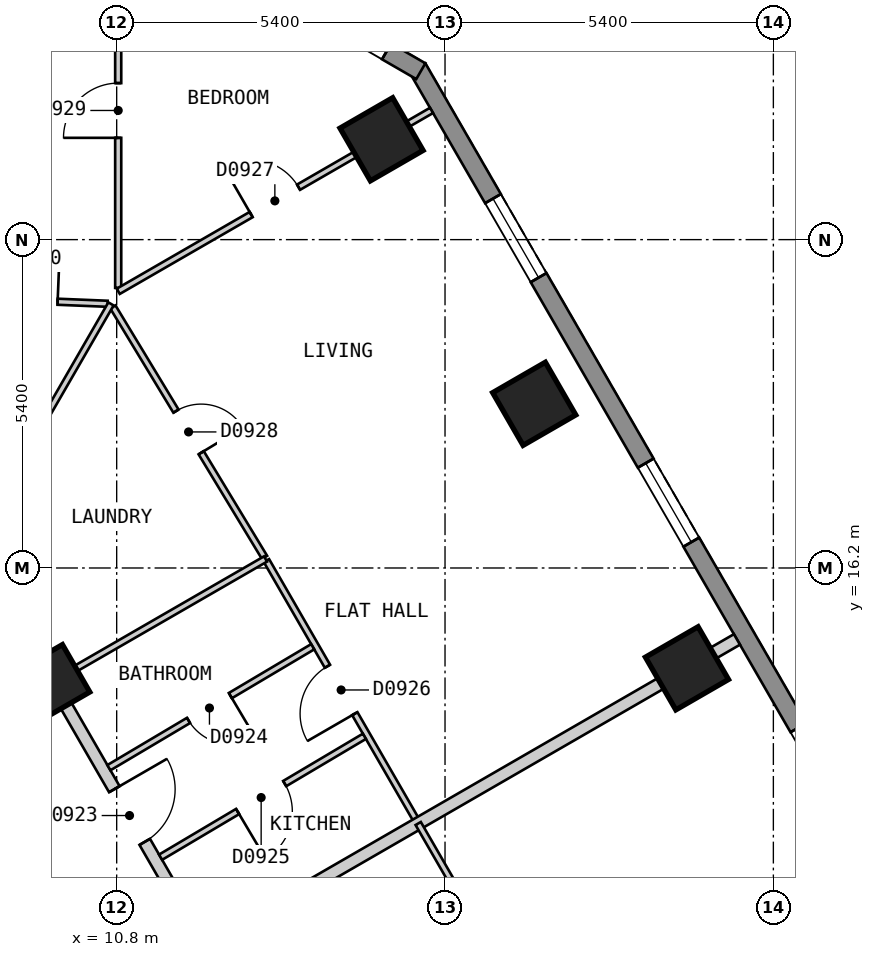
"""IFC4 building model, lengths in metres.
Left out: names, types, materials, properties, quantities, classifications, styles, units other than length and angle.
Written with IfcOpenShell. Run it as: python <this file> out.ifc"""

import sys

from ifc_helpers import new_model, si_unit, direction, frame, frame_2d, origin, origin_2d, place, context, subcontext, project, spatial, polyline, rectangle, outline, extrude, element, fill, save


model = new_model("IFC4")
c1 = context("Model", 3, precision=1e-05, world=origin(), true_north=direction((0.0, 1.0)))
c2 = subcontext(c1, "Body", "Model", "MODEL_VIEW")
j1 = project(units=[si_unit("LENGTHUNIT", "METRE"), si_unit("PLANEANGLEUNIT", "RADIAN")], contexts=[c1])
p1 = place(None, origin())
s1 = spatial("IfcSite", under=j1, at=p1, CompositionType="ELEMENT")
p2 = place(p1, origin())
s2 = spatial("IfcBuilding", under=s1, at=p2, CompositionType="ELEMENT")
p3 = place(p2, frame((0.0, 0.0, 102.0)))
s3 = spatial("IfcBuildingStorey", under=s2, at=p3, CompositionType="ELEMENT", Elevation=102.0)
for number, where, z_axis, x_axis in (
    (1, (20.179, 14.55, 0.0), (0.0, 0.0, 1.0), (-0.5, 0.866, 0.0)),
    (2, (17.667, 18.9, 0.0), (0.0, 0.0, 1.0), (-0.5, 0.866, 0.0)),
    (3, (15.156, 23.25, 0.0), (0.0, 0.0, 1.0), (-0.5, 0.866, 0.0)),
):
    element("IfcColumn", number, at=place(p3, frame(where, z_axis=z_axis, x_axis=x_axis)), inside=s3, PredefinedType="COLUMN", context=c2, shape_type="SweptSolid", body=[
        extrude(rectangle(XDim=1.0, YDim=1.0, at=origin_2d()), origin(), (0.0, 0.0, 1.0), 3.0),
    ])
p4 = place(p3, frame((9.743, 14.325, 0.0), z_axis=(0.0, 0.0, 1.0), x_axis=(-0.5, 0.866025403784, 0.0)))
e4 = element("IfcColumn", 4, at=p4, inside=s3, PredefinedType="COLUMN", context=c2, shape_type="SweptSolid", body=[
    extrude(rectangle(XDim=0.9, YDim=0.9, at=origin_2d()), origin(), (0.0, 0.0, 1.0), 3.0),
])
p5 = place(p3, frame((29.027, 1.425, 0.0), z_axis=(0.0, 0.0, 1.0), x_axis=(-0.500027479704, 0.866009537788, 0.0)))
e5 = element("IfcWall", 5, at=p5, inside=s3, PredefinedType="SOLIDWALL", context=c2, shape_type="SweptSolid", body=[
    extrude(outline(polyline([(0.0, -0.15), (26.559, -0.15), (26.478, 0.15), (0.08, 0.15), (0.0, -0.15)])), origin(), (0.0, 0.0, 1.0), 2.7),
])
p6 = place(p5, frame((2.483, 0.0, 0.15)))
e6 = element("IfcOpeningElement", 6, at=p6, cuts=e5, PredefinedType="OPENING", context=c2, shape_type="SweptSolid", body=[
    extrude(rectangle(XDim=1.5, YDim=2.1, at=frame_2d((0.75, 1.05))), frame((0.0, 0.16, 0.0), z_axis=(0.0, -1.0, 0.0), x_axis=(1.0, 0.0, 0.0)), (0.0, 0.0, 1.0), 0.32),
])
p7 = place(p5, frame((7.506, 0.0, 0.15)))
e7 = element("IfcOpeningElement", 7, at=p7, cuts=e5, PredefinedType="OPENING", context=c2, shape_type="SweptSolid", body=[
    extrude(rectangle(XDim=1.5, YDim=2.1, at=frame_2d((0.75, 1.05))), frame((0.0, 0.16, 0.0), z_axis=(0.0, -1.0, 0.0), x_axis=(1.0, 0.0, 0.0)), (0.0, 0.0, 1.0), 0.32),
])
p8 = place(p5, frame((12.529, 0.0, 0.15)))
e8 = element("IfcOpeningElement", 8, at=p8, cuts=e5, PredefinedType="OPENING", context=c2, shape_type="SweptSolid", body=[
    extrude(rectangle(XDim=1.5, YDim=2.1, at=frame_2d((0.75, 1.05))), frame((0.0, 0.16, 0.0), z_axis=(0.0, -1.0, 0.0), x_axis=(1.0, 0.0, 0.0)), (0.0, 0.0, 1.0), 0.32),
])
p9 = place(p5, frame((17.552, 0.0, 0.15)))
e9 = element("IfcOpeningElement", 9, at=p9, cuts=e5, PredefinedType="OPENING", context=c2, shape_type="SweptSolid", body=[
    extrude(rectangle(XDim=1.5, YDim=2.1, at=frame_2d((0.75, 1.05))), frame((0.0, 0.16, 0.0), z_axis=(0.0, -1.0, 0.0), x_axis=(1.0, 0.0, 0.0)), (0.0, 0.0, 1.0), 0.32),
])
p10 = place(p5, frame((22.575, 0.0, 0.15)))
e10 = element("IfcOpeningElement", 10, at=p10, cuts=e5, PredefinedType="OPENING", context=c2, shape_type="SweptSolid", body=[
    extrude(rectangle(XDim=1.5, YDim=2.1, at=frame_2d((0.75, 1.05))), frame((0.0, 0.16, 0.0), z_axis=(0.0, -1.0, 0.0), x_axis=(1.0, 0.0, 0.0)), (0.0, 0.0, 1.0), 0.32),
])
p11 = place(p3, frame((15.802, 24.37, 0.0), z_axis=(0.0, 0.0, 1.0), x_axis=(-0.866022959057, 0.500004234368, 0.0)))
e11 = element("IfcWall", 11, at=p11, inside=s3, PredefinedType="SOLIDWALL", context=c2, shape_type="SweptSolid", body=[
    extrude(outline(polyline([(0.0, -0.15), (5.0, -0.15), (4.92, 0.15), (0.08, 0.15), (0.0, -0.15)])), origin(), (0.0, 0.0, 1.0), 2.7),
])
p12 = place(p11, frame((0.65, 0.0, 0.15)))
e12 = element("IfcOpeningElement", 12, at=p12, cuts=e11, PredefinedType="OPENING", context=c2, shape_type="SweptSolid", body=[
    extrude(rectangle(XDim=1.2, YDim=2.1, at=frame_2d((0.6, 1.05))), frame((0.0, 0.16, 0.0), z_axis=(0.0, -1.0, 0.0), x_axis=(1.0, 0.0, 0.0)), (0.0, 0.0, 1.0), 0.32),
])
p13 = place(p3, frame((8.488, 16.5, 0.0), z_axis=(0.0, 0.0, 1.0), x_axis=(0.499986836607, -0.86603300354, 0.0)))
e13 = element("IfcWall", 13, at=p13, inside=s3, PredefinedType="PARTITIONING", context=c2, shape_type="SweptSolid", body=[
    extrude(rectangle(XDim=20.09, YDim=0.2, at=frame_2d((10.045, 0.0))), origin(), (0.0, 0.0, 1.0), 2.7),
])
p14 = place(p13, frame((14.569, 0.0, 0.0)))
e14 = element("IfcOpeningElement", 14, at=p14, cuts=e13, PredefinedType="OPENING", context=c2, shape_type="SweptSolid", body=[
    extrude(rectangle(XDim=1.0, YDim=2.1, at=frame_2d((0.5, 1.05))), frame((0.0, 0.11, 0.0), z_axis=(0.0, -1.0, 0.0), x_axis=(1.0, 0.0, 0.0)), (0.0, 0.0, 1.0), 0.22),
])
p15 = place(p13, frame((4.547, 0.0, 0.0)))
e15 = element("IfcOpeningElement", 15, at=p15, cuts=e13, PredefinedType="OPENING", context=c2, shape_type="SweptSolid", body=[
    extrude(rectangle(XDim=1.0, YDim=2.1, at=frame_2d((0.5, 1.05))), frame((0.0, 0.11, 0.0), z_axis=(0.0, -1.0, 0.0), x_axis=(1.0, 0.0, 0.0)), (0.0, 0.0, 1.0), 0.22),
])
p16 = place(p3, frame((10.738, 20.492, 0.0), z_axis=(0.0, 0.0, 1.0), x_axis=(0.518026330534, -0.85536467128, 0.0)))
e16 = element("IfcWall", 16, at=p16, inside=s3, PredefinedType="PARTITIONING", context=c2, shape_type="SweptSolid", body=[
    extrude(rectangle(XDim=4.814, YDim=0.1, at=frame_2d((2.407, 0.0))), origin(), (0.0, 0.0, 1.0), 2.7),
])
p17 = place(p16, frame((2.002, 0.0, 0.0)))
e17 = element("IfcOpeningElement", 17, at=p17, cuts=e16, PredefinedType="OPENING", context=c2, shape_type="SweptSolid", body=[
    extrude(rectangle(XDim=0.8, YDim=2.1, at=frame_2d((0.4, 1.05))), frame((0.0, 0.06, 0.0), z_axis=(0.0, -1.0, 0.0), x_axis=(1.0, 0.0, 0.0)), (0.0, 0.0, 1.0), 0.12),
])
p18 = place(p3, frame((13.263, 16.322, 0.0), z_axis=(0.0, 0.0, 1.0), x_axis=(0.499946798379, -0.866056117576, 0.0)))
e18 = element("IfcWall", 18, at=p18, inside=s3, PredefinedType="PARTITIONING", context=c2, shape_type="SweptSolid", body=[
    extrude(rectangle(XDim=4.993, YDim=0.1, at=frame_2d((2.496, 0.0))), origin(), (0.0, 0.0, 1.0), 2.7),
])
p19 = place(p18, frame((2.007, 0.0, 0.0)))
e19 = element("IfcOpeningElement", 19, at=p19, cuts=e18, PredefinedType="OPENING", context=c2, shape_type="SweptSolid", body=[
    extrude(rectangle(XDim=0.9, YDim=2.1, at=frame_2d((0.45, 1.05))), frame((0.0, 0.06, 0.0), z_axis=(0.0, -1.0, 0.0), x_axis=(1.0, 0.0, 0.0)), (0.0, 0.0, 1.0), 0.12),
])
p20 = place(p3, frame((8.151, 20.647, 0.0), z_axis=(0.0, 0.0, 1.0), x_axis=(0.999167241152, -0.040802257405, 0.0)))
e20 = element("IfcWall", 20, at=p20, inside=s3, PredefinedType="PARTITIONING", context=c2, shape_type="SweptSolid", body=[
    extrude(rectangle(XDim=2.501, YDim=0.1, at=frame_2d((1.25, 0.0))), origin(), (0.0, 0.0, 1.0), 2.7),
])
p21 = place(p20, frame((0.879, 0.0, 0.0)))
e21 = element("IfcOpeningElement", 21, at=p21, cuts=e20, PredefinedType="OPENING", context=c2, shape_type="SweptSolid", body=[
    extrude(rectangle(XDim=0.8, YDim=2.1, at=frame_2d((0.4, 1.05))), frame((0.0, 0.06, 0.0), z_axis=(0.0, -1.0, 0.0), x_axis=(1.0, 0.0, 0.0)), (0.0, 0.0, 1.0), 0.12),
])
p22 = place(p3, frame((8.43, 16.6, 0.0), z_axis=(0.0, 0.0, 1.0), x_axis=(0.499951460778, 0.866053426104, 0.0)))
e22 = element("IfcWall", 22, at=p22, inside=s3, PredefinedType="PARTITIONING", context=c2, shape_type="SweptSolid", body=[
    extrude(rectangle(XDim=4.553, YDim=0.1, at=frame_2d((2.276, 0.0))), origin(), (0.0, 0.0, 1.0), 2.7),
])
p23 = place(p3, frame((10.825, 20.806, 0.0), z_axis=(0.0, 0.0, 1.0), x_axis=(0.0, 1.0, 0.0)))
e23 = element("IfcWall", 23, at=p23, inside=s3, PredefinedType="PARTITIONING", context=c2, shape_type="SweptSolid", body=[
    extrude(rectangle(XDim=5.894, YDim=0.1, at=frame_2d((2.947, 0.0))), origin(), (0.0, 0.0, 1.0), 2.7),
])
p24 = place(p23, frame((2.468, 0.0, 0.0)))
e24 = element("IfcOpeningElement", 24, at=p24, cuts=e23, PredefinedType="OPENING", context=c2, shape_type="SweptSolid", body=[
    extrude(rectangle(XDim=0.9, YDim=2.1, at=frame_2d((0.45, 1.05))), frame((0.0, 0.06, 0.0), z_axis=(0.0, -1.0, 0.0), x_axis=(1.0, 0.0, 0.0)), (0.0, 0.0, 1.0), 0.12),
])
p25 = place(p3, frame((9.83, 14.375, 0.0), z_axis=(0.0, 0.0, 1.0), x_axis=(0.866076396086, 0.499911668341, 0.0)))
e25 = element("IfcWall", 25, at=p25, inside=s3, PredefinedType="PARTITIONING", context=c2, shape_type="SweptSolid", body=[
    extrude(rectangle(XDim=3.947, YDim=0.1, at=frame_2d((1.973, 0.0))), origin(), (0.0, 0.0, 1.0), 2.7),
])
p26 = place(p3, frame((10.826, 20.75, 0.0), z_axis=(0.0, 0.0, 1.0), x_axis=(0.865986712877, 0.50006700863, 0.0)))
e26 = element("IfcWall", 26, at=p26, inside=s3, PredefinedType="PARTITIONING", context=c2, shape_type="SweptSolid", body=[
    extrude(rectangle(XDim=5.949, YDim=0.1, at=frame_2d((2.975, 0.0))), origin(), (0.0, 0.0, 1.0), 2.7),
])
p27 = place(p26, frame((2.524, 0.0, 0.0)))
e27 = element("IfcOpeningElement", 27, at=p27, cuts=e26, PredefinedType="OPENING", context=c2, shape_type="SweptSolid", body=[
    extrude(rectangle(XDim=0.9, YDim=2.1, at=frame_2d((0.45, 1.05))), frame((0.0, 0.06, 0.0), z_axis=(0.0, -1.0, 0.0), x_axis=(1.0, 0.0, 0.0)), (0.0, 0.0, 1.0), 0.12),
])
p28 = place(p3, frame((11.522, 11.444, 0.0), z_axis=(0.0, 0.0, 1.0), x_axis=(0.860134781641, 0.510066816615, 0.0)))
e28 = element("IfcWall", 28, at=p28, inside=s3, PredefinedType="PARTITIONING", context=c2, shape_type="SweptSolid", body=[
    extrude(rectangle(XDim=3.897, YDim=0.1, at=frame_2d((1.949, 0.0))), origin(), (0.0, 0.0, 1.0), 2.7),
])
p29 = place(p28, frame((1.473, 0.0, 0.0)))
e29 = element("IfcOpeningElement", 29, at=p29, cuts=e28, PredefinedType="OPENING", context=c2, shape_type="SweptSolid", body=[
    extrude(rectangle(XDim=0.9, YDim=2.1, at=frame_2d((0.45, 1.05))), frame((0.0, 0.06, 0.0), z_axis=(0.0, -1.0, 0.0), x_axis=(1.0, 0.0, 0.0)), (0.0, 0.0, 1.0), 0.12),
])
p30 = place(p3, frame((10.672, 12.916, 0.0), z_axis=(0.0, 0.0, 1.0), x_axis=(0.859981037235, 0.510325989537, 0.0)))
e30 = element("IfcWall", 30, at=p30, inside=s3, PredefinedType="PARTITIONING", context=c2, shape_type="SweptSolid", body=[
    extrude(rectangle(XDim=3.897, YDim=0.1, at=frame_2d((1.949, 0.0))), origin(), (0.0, 0.0, 1.0), 2.7),
])
p31 = place(p30, frame((1.523, 0.0, 0.0)))
e31 = element("IfcOpeningElement", 31, at=p31, cuts=e30, PredefinedType="OPENING", context=c2, shape_type="SweptSolid", body=[
    extrude(rectangle(XDim=0.8, YDim=2.1, at=frame_2d((0.4, 1.05))), frame((0.0, 0.06, 0.0), z_axis=(0.0, -1.0, 0.0), x_axis=(1.0, 0.0, 0.0)), (0.0, 0.0, 1.0), 0.12),
])
p32 = place(p3, frame((12.342, 10.025, 0.0), z_axis=(0.0, 0.0, 1.0), x_axis=(0.865992435864, 0.500057097767, 0.0)))
e32 = element("IfcWall", 32, at=p32, inside=s3, PredefinedType="PARTITIONING", context=c2, shape_type="SweptSolid", body=[
    extrude(rectangle(XDim=9.999, YDim=0.2, at=frame_2d((5.0, 0.0))), origin(), (0.0, 0.0, 1.0), 2.7),
])
p33 = place(p3, frame((15.759, 11.998, 0.0), z_axis=(0.0, 0.0, 1.0), x_axis=(0.500068444113, -0.865985883951, 0.0)))
e33 = element("IfcWall", 33, at=p33, inside=s3, PredefinedType="PARTITIONING", context=c2, shape_type="SweptSolid", body=[
    extrude(rectangle(XDim=9.997, YDim=0.1, at=frame_2d((4.998, 0.0))), origin(), (0.0, 0.0, 1.0), 2.7),
])
p34 = place(p33, frame((7.074, 0.0, 0.0)))
e34 = element("IfcOpeningElement", 34, at=p34, cuts=e33, PredefinedType="OPENING", context=c2, shape_type="SweptSolid", body=[
    extrude(rectangle(XDim=0.9, YDim=2.1, at=frame_2d((0.45, 1.05))), frame((0.0, 0.06, 0.0), z_axis=(0.0, -1.0, 0.0), x_axis=(1.0, 0.0, 0.0)), (0.0, 0.0, 1.0), 0.12),
])
p35 = place(p9, origin())
e35 = element("IfcWindow", 35, at=p35, inside=s3, PartitioningType="SINGLE_PANEL", PredefinedType="WINDOW", context=c2, shape_type="SweptSolid", body=[
    extrude(rectangle(XDim=1.5, YDim=2.1, at=frame_2d((0.75, 1.05))), frame((0.0, 0.03, 0.0), z_axis=(0.0, -1.0, 0.0), x_axis=(1.0, 0.0, 0.0)), (0.0, 0.0, 1.0), 0.06),
])
fill(e9, e35)
p36 = place(p10, origin())
e36 = element("IfcWindow", 36, at=p36, inside=s3, PartitioningType="SINGLE_PANEL", PredefinedType="WINDOW", context=c2, shape_type="SweptSolid", body=[
    extrude(rectangle(XDim=1.5, YDim=2.1, at=frame_2d((0.75, 1.05))), frame((0.0, 0.03, 0.0), z_axis=(0.0, -1.0, 0.0), x_axis=(1.0, 0.0, 0.0)), (0.0, 0.0, 1.0), 0.06),
])
fill(e10, e36)
p37 = place(p12, origin())
e37 = element("IfcWindow", 37, at=p37, inside=s3, PartitioningType="SINGLE_PANEL", PredefinedType="WINDOW", context=c2, shape_type="SweptSolid", body=[
    extrude(rectangle(XDim=1.2, YDim=2.1, at=frame_2d((0.6, 1.05))), frame((0.0, 0.03, 0.0), z_axis=(0.0, -1.0, 0.0), x_axis=(1.0, 0.0, 0.0)), (0.0, 0.0, 1.0), 0.06),
])
fill(e12, e37)
p38 = place(p15, origin())
e38 = element("IfcDoor", 38, at=p38, inside=s3, OperationType="SINGLE_SWING_LEFT", PredefinedType="DOOR", context=c2, shape_type="SweptSolid", body=[
    extrude(rectangle(XDim=1.0, YDim=2.1, at=frame_2d((0.5, 1.05))), frame((0.0, 0.025, 0.0), z_axis=(0.0, -1.0, 0.0), x_axis=(1.0, 0.0, 0.0)), (0.0, 0.0, 1.0), 0.05),
])
fill(e15, e38)
p39 = place(p31, origin())
e39 = element("IfcDoor", 39, at=p39, inside=s3, OperationType="SINGLE_SWING_RIGHT", PredefinedType="DOOR", context=c2, shape_type="SweptSolid", body=[
    extrude(rectangle(XDim=0.8, YDim=2.1, at=frame_2d((0.4, 1.05))), frame((0.0, 0.025, 0.0), z_axis=(0.0, -1.0, 0.0), x_axis=(1.0, 0.0, 0.0)), (0.0, 0.0, 1.0), 0.05),
])
fill(e31, e39)
p40 = place(p29, origin())
e40 = element("IfcDoor", 40, at=p40, inside=s3, OperationType="SINGLE_SWING_LEFT", PredefinedType="DOOR", context=c2, shape_type="SweptSolid", body=[
    extrude(rectangle(XDim=0.9, YDim=2.1, at=frame_2d((0.45, 1.05))), frame((0.0, 0.025, 0.0), z_axis=(0.0, -1.0, 0.0), x_axis=(1.0, 0.0, 0.0)), (0.0, 0.0, 1.0), 0.05),
])
fill(e29, e40)
p41 = place(p19, origin())
e41 = element("IfcDoor", 41, at=p41, inside=s3, OperationType="SINGLE_SWING_RIGHT", PredefinedType="DOOR", context=c2, shape_type="SweptSolid", body=[
    extrude(rectangle(XDim=0.9, YDim=2.1, at=frame_2d((0.45, 1.05))), frame((0.0, 0.025, 0.0), z_axis=(0.0, -1.0, 0.0), x_axis=(1.0, 0.0, 0.0)), (0.0, 0.0, 1.0), 0.05),
])
fill(e19, e41)
p42 = place(p27, origin())
e42 = element("IfcDoor", 42, at=p42, inside=s3, OperationType="SINGLE_SWING_LEFT", PredefinedType="DOOR", context=c2, shape_type="SweptSolid", body=[
    extrude(rectangle(XDim=0.9, YDim=2.1, at=frame_2d((0.45, 1.05))), frame((0.0, 0.025, 0.0), z_axis=(0.0, -1.0, 0.0), x_axis=(1.0, 0.0, 0.0)), (0.0, 0.0, 1.0), 0.05),
])
fill(e27, e42)
p43 = place(p17, origin())
e43 = element("IfcDoor", 43, at=p43, inside=s3, OperationType="SINGLE_SWING_RIGHT", PredefinedType="DOOR", context=c2, shape_type="SweptSolid", body=[
    extrude(rectangle(XDim=0.8, YDim=2.1, at=frame_2d((0.4, 1.05))), frame((0.0, 0.025, 0.0), z_axis=(0.0, -1.0, 0.0), x_axis=(1.0, 0.0, 0.0)), (0.0, 0.0, 1.0), 0.05),
])
fill(e17, e43)
p44 = place(p24, origin())
e44 = element("IfcDoor", 44, at=p44, inside=s3, OperationType="SINGLE_SWING_LEFT", PredefinedType="DOOR", context=c2, shape_type="SweptSolid", body=[
    extrude(rectangle(XDim=0.9, YDim=2.1, at=frame_2d((0.45, 1.05))), frame((0.0, 0.025, 0.0), z_axis=(0.0, -1.0, 0.0), x_axis=(1.0, 0.0, 0.0)), (0.0, 0.0, 1.0), 0.05),
])
fill(e24, e44)
p45 = place(p21, origin())
e45 = element("IfcDoor", 45, at=p45, inside=s3, OperationType="SINGLE_SWING_RIGHT", PredefinedType="DOOR", context=c2, shape_type="SweptSolid", body=[
    extrude(rectangle(XDim=0.8, YDim=2.1, at=frame_2d((0.4, 1.05))), frame((0.0, 0.025, 0.0), z_axis=(0.0, -1.0, 0.0), x_axis=(1.0, 0.0, 0.0)), (0.0, 0.0, 1.0), 0.05),
])
fill(e21, e45)
save(model, sys.argv[1])
